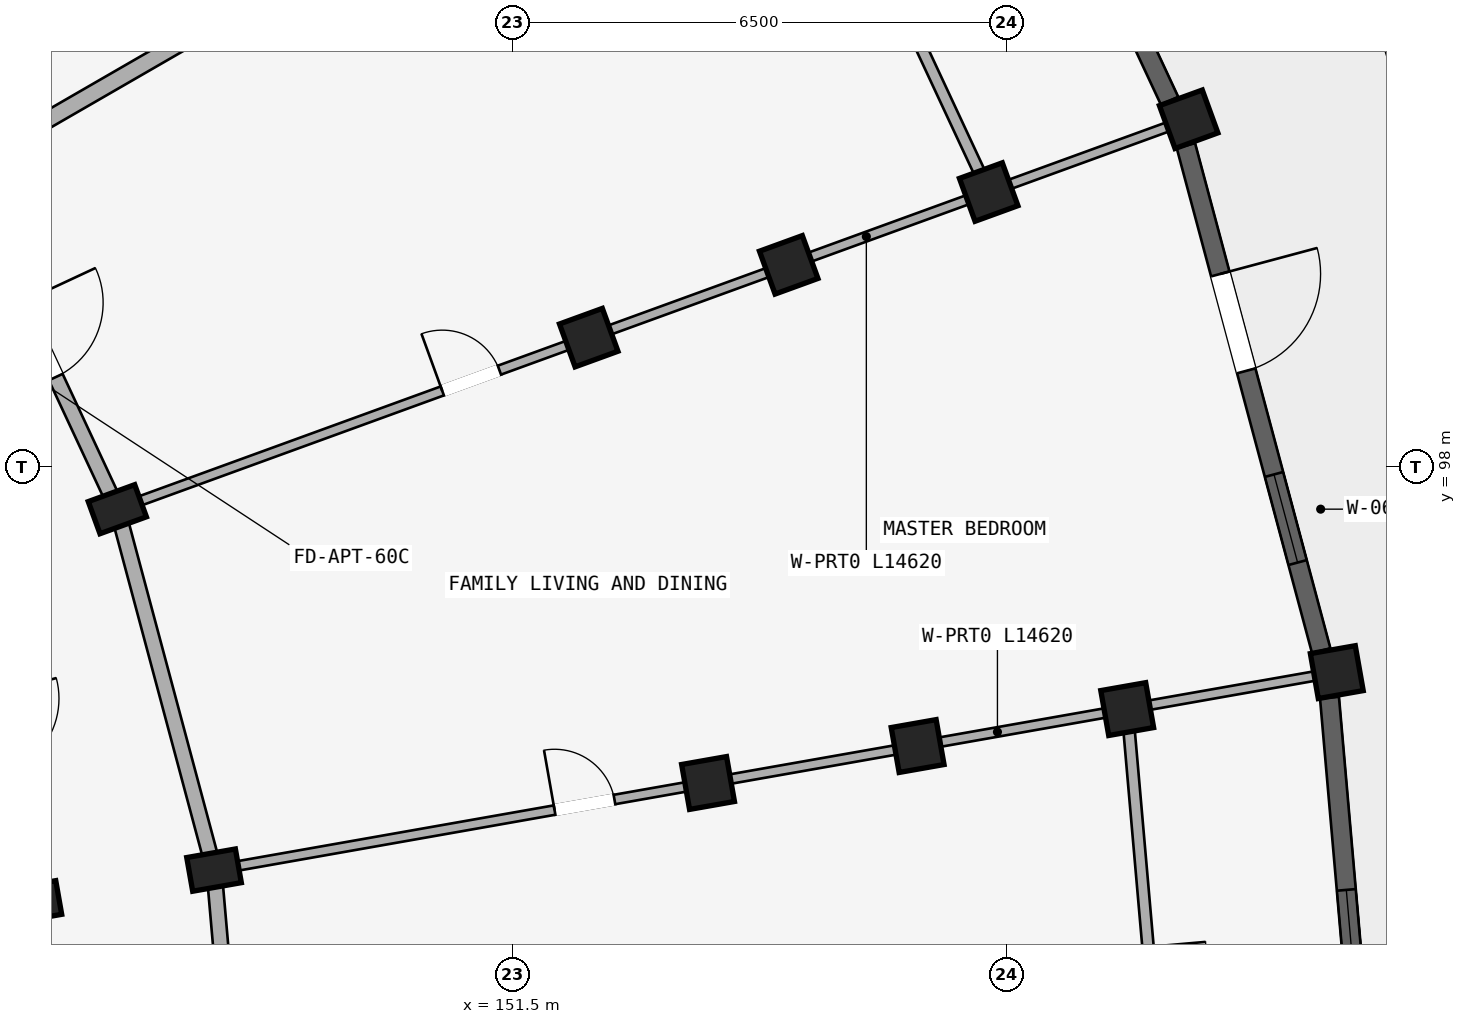
"""IFC4 building model, lengths in metres.
Left out: names, types, materials, properties, quantities, classifications, styles, units other than length and angle.
Written with IfcOpenShell. Run it as: python <this file> out.ifc"""

import sys

from ifc_helpers import new_model, si_unit, direction, frame, frame_2d, origin, origin_2d, place, context, subcontext, project, spatial, rectangle, extrude, element, fill, save


model = new_model("IFC4")
c1 = context("Model", 3, precision=1e-05, world=origin(), true_north=direction((0.0, 1.0)))
c2 = subcontext(c1, "Body", "Model", "MODEL_VIEW")
j1 = project(units=[si_unit("LENGTHUNIT", "METRE"), si_unit("PLANEANGLEUNIT", "RADIAN")], contexts=[c1])
p1 = place(None, origin())
s1 = spatial("IfcSite", under=j1, at=p1, CompositionType="ELEMENT")
p2 = place(p1, origin())
s2 = spatial("IfcBuilding", under=s1, at=p2, CompositionType="ELEMENT")
p3 = place(p2, frame((0.0, 0.0, 30.75)))
s3 = spatial("IfcBuildingStorey", under=s2, at=p3, CompositionType="ELEMENT", Elevation=30.75)
p4 = place(p3, frame((146.299, 97.445, 0.0), z_axis=(0.0, 0.0, 1.0), x_axis=(-0.342020143326, 0.939692620786, 0.0)))
e1 = element("IfcColumn", 1, at=p4, inside=s3, PredefinedType="COLUMN", context=c2, shape_type="SweptSolid", body=[
    extrude(rectangle(XDim=0.45, YDim=0.65, at=origin_2d()), origin(), (0.0, 0.0, 1.0), 2.93),
])
for number, where, z_axis, x_axis in (
    (2, (152.501, 99.702, 0.0), (0.0, 0.0, 1.0), (-0.342, 0.94, 0.0)),
    (3, (155.132, 100.66, 0.0), (0.0, 0.0, 1.0), (-0.342, 0.94, 0.0)),
    (4, (157.764, 101.618, 0.0), (0.0, 0.0, 1.0), (-0.342, 0.94, 0.0)),
):
    element("IfcColumn", number, at=place(p3, frame(where, z_axis=z_axis, x_axis=x_axis)), inside=s3, PredefinedType="COLUMN", context=c2, shape_type="SweptSolid", body=[
        extrude(rectangle(XDim=0.6, YDim=0.6, at=origin_2d()), origin(), (0.0, 0.0, 1.0), 2.93),
    ])
p5 = place(p3, frame((160.395, 102.575, 0.0), z_axis=(0.0, 0.0, 1.0), x_axis=(-0.342020143326, 0.939692620786, 0.0)))
e5 = element("IfcColumn", 5, at=p5, inside=s3, PredefinedType="COLUMN", context=c2, shape_type="SweptSolid", body=[
    extrude(rectangle(XDim=0.6, YDim=0.6, at=origin_2d()), origin(), (0.0, 0.0, 1.0), 2.97),
])
for number, where, z_axis, x_axis in (
    (6, (145.208, 92.28, 0.0), (0.0, 0.0, 1.0), (-0.174, 0.985, 0.0)),
    (7, (147.572, 92.697, 0.0), (0.0, 0.0, 1.0), (-0.174, 0.985, 0.0)),
):
    element("IfcColumn", number, at=place(p3, frame(where, z_axis=z_axis, x_axis=x_axis)), inside=s3, PredefinedType="COLUMN", context=c2, shape_type="SweptSolid", body=[
        extrude(rectangle(XDim=0.45, YDim=0.65, at=origin_2d()), origin(), (0.0, 0.0, 1.0), 2.93),
    ])
for number, where, z_axis, x_axis in (
    (8, (154.071, 93.843, 0.0), (0.0, 0.0, 1.0), (-0.174, 0.985, 0.0)),
    (9, (156.829, 94.329, 0.0), (0.0, 0.0, 1.0), (-0.174, 0.985, 0.0)),
    (10, (159.586, 94.815, 0.0), (0.0, 0.0, 1.0), (-0.174, 0.985, 0.0)),
):
    element("IfcColumn", number, at=place(p3, frame(where, z_axis=z_axis, x_axis=x_axis)), inside=s3, PredefinedType="COLUMN", context=c2, shape_type="SweptSolid", body=[
        extrude(rectangle(XDim=0.6, YDim=0.6, at=origin_2d()), origin(), (0.0, 0.0, 1.0), 2.93),
    ])
p6 = place(p3, frame((162.344, 95.302, 0.0), z_axis=(0.0, 0.0, 1.0), x_axis=(-0.173648177667, 0.984807753012, 0.0)))
e11 = element("IfcColumn", 11, at=p6, inside=s3, PredefinedType="COLUMN", context=c2, shape_type="SweptSolid", body=[
    extrude(rectangle(XDim=0.6, YDim=0.6, at=origin_2d()), origin(), (0.0, 0.0, 1.0), 2.97),
])
p7 = place(p3, frame((144.222, 101.9, 0.0), z_axis=(0.0, 0.0, 1.0), x_axis=(0.422629854778, -0.906302381024, 0.0)))
e12 = element("IfcWall", 12, at=p7, inside=s3, PredefinedType="STANDARD", context=c2, shape_type="SweptSolid", body=[
    extrude(rectangle(XDim=4.915, YDim=0.2, at=frame_2d((2.458, 0.0))), origin(), (0.0, 0.0, 1.0), 2.372),
])
p8 = place(p7, frame((1.918, 0.0, 0.0)))
e13 = element("IfcOpeningElement", 13, at=p8, cuts=e12, PredefinedType="OPENING", context=c2, shape_type="SweptSolid", body=[
    extrude(rectangle(XDim=1.08, YDim=2.15, at=frame_2d((0.54, 1.075))), frame((0.0, 0.11, 0.0), z_axis=(0.0, -1.0, 0.0), x_axis=(1.0, 0.0, 0.0)), (0.0, 0.0, 1.0), 0.22),
])
p9 = place(p3, frame((146.299, 97.445, 0.0), z_axis=(0.0, 0.0, 1.0), x_axis=(0.258803112091, -0.965930095386, 0.0)))
e14 = element("IfcWall", 14, at=p9, inside=s3, PredefinedType="STANDARD", context=c2, shape_type="SweptSolid", body=[
    extrude(rectangle(XDim=4.916, YDim=0.2, at=frame_2d((2.458, 0.0))), origin(), (0.0, 0.0, 1.0), 2.372),
])
p10 = place(p3, frame((145.208, 92.28, 0.0), z_axis=(0.0, 0.0, 1.0), x_axis=(0.087187153726, -0.996191949488, 0.0)))
e15 = element("IfcWall", 15, at=p10, inside=s3, PredefinedType="STANDARD", context=c2, shape_type="SweptSolid", body=[
    extrude(rectangle(XDim=4.497, YDim=0.2, at=frame_2d((2.249, 0.0))), origin(), (0.0, 0.0, 1.0), 2.372),
])
p11 = place(p3, frame((147.572, 92.697, 0.0), z_axis=(0.0, 0.0, 1.0), x_axis=(0.087167566415, -0.996193663584, 0.0)))
e16 = element("IfcWall", 16, at=p11, inside=s3, PredefinedType="STANDARD", context=c2, shape_type="SweptSolid", body=[
    extrude(rectangle(XDim=4.916, YDim=0.2, at=frame_2d((2.458, 0.0))), origin(), (0.0, 0.0, 1.0), 2.372),
])
p12 = place(p3, frame((144.309, 101.95, 0.0), z_axis=(0.0, 0.0, 1.0), x_axis=(0.866020956416, 0.500007702989, 0.0)))
e17 = element("IfcWall", 17, at=p12, inside=s3, PredefinedType="STANDARD", context=c2, shape_type="SweptSolid", body=[
    extrude(rectangle(XDim=14.62, YDim=0.22, at=frame_2d((7.31, 0.0))), origin(), (0.0, 0.0, 1.0), 2.372),
])
p13 = place(p3, frame((146.393, 97.479, 0.0), z_axis=(0.0, 0.0, 1.0), x_axis=(0.939694408106, 0.342015232663, 0.0)))
e18 = element("IfcWall", 18, at=p13, inside=s3, PredefinedType="PARTITIONING", context=c2, shape_type="SweptSolid", body=[
    extrude(rectangle(XDim=14.62, YDim=0.125, at=frame_2d((7.31, 0.0))), origin(), (0.0, 0.0, 1.0), 2.372),
])
p14 = place(p13, frame((4.449, 0.0, 0.0)))
e19 = element("IfcOpeningElement", 19, at=p14, cuts=e18, PredefinedType="OPENING", context=c2, shape_type="SweptSolid", body=[
    extrude(rectangle(XDim=0.8, YDim=2.1, at=frame_2d((0.4, 1.05))), frame((0.0, 0.073, 0.0), z_axis=(0.0, -1.0, 0.0), x_axis=(1.0, 0.0, 0.0)), (0.0, 0.0, 1.0), 0.145),
])
p15 = place(p3, frame((147.67, 92.714, 0.0), z_axis=(0.0, 0.0, 1.0), x_axis=(0.984809269474, 0.173639577162, 0.0)))
e20 = element("IfcWall", 20, at=p15, inside=s3, PredefinedType="PARTITIONING", context=c2, shape_type="SweptSolid", body=[
    extrude(rectangle(XDim=14.62, YDim=0.125, at=frame_2d((7.31, 0.0))), origin(), (0.0, 0.0, 1.0), 2.372),
])
p16 = place(p15, frame((4.449, 0.0, 0.0)))
e21 = element("IfcOpeningElement", 21, at=p16, cuts=e20, PredefinedType="OPENING", context=c2, shape_type="SweptSolid", body=[
    extrude(rectangle(XDim=0.8, YDim=2.1, at=frame_2d((0.4, 1.05))), frame((0.0, 0.073, 0.0), z_axis=(0.0, -1.0, 0.0), x_axis=(1.0, 0.0, 0.0)), (0.0, 0.0, 1.0), 0.145),
])
p17 = place(p3, frame((154.787, 108.0, 0.0), z_axis=(0.0, 0.0, 1.0), x_axis=(0.422640621205, -0.906297360311, 0.0)))
e22 = element("IfcWall", 22, at=p17, inside=s3, PredefinedType="PLUMBINGWALL", context=c2, shape_type="SweptSolid", body=[
    extrude(rectangle(XDim=7.042, YDim=0.15, at=frame_2d((3.521, 0.0))), origin(), (0.0, 0.0, 1.0), 2.372),
])
p18 = place(p17, frame((3.121, 0.0, 0.0)))
e23 = element("IfcOpeningElement", 23, at=p18, cuts=e22, PredefinedType="OPENING", context=c2, shape_type="SweptSolid", body=[
    extrude(rectangle(XDim=0.8, YDim=2.1, at=frame_2d((0.4, 1.05))), frame((0.0, 0.085, 0.0), z_axis=(0.0, -1.0, 0.0), x_axis=(1.0, 0.0, 0.0)), (0.0, 0.0, 1.0), 0.17),
])
p19 = place(p3, frame((159.586, 94.815, 0.0), z_axis=(0.0, 0.0, 1.0), x_axis=(0.087156198737, -0.996194658198, 0.0)))
e24 = element("IfcWall", 24, at=p19, inside=s3, PredefinedType="PLUMBINGWALL", context=c2, shape_type="SweptSolid", body=[
    extrude(rectangle(XDim=7.042, YDim=0.15, at=frame_2d((3.521, 0.0))), origin(), (0.0, 0.0, 1.0), 2.372),
])
p20 = place(p19, frame((3.141, 0.0, 0.0)))
e25 = element("IfcOpeningElement", 25, at=p20, cuts=e24, PredefinedType="OPENING", context=c2, shape_type="SweptSolid", body=[
    extrude(rectangle(XDim=0.76, YDim=2.05, at=frame_2d((0.38, 1.025))), frame((0.0, 0.085, 0.0), z_axis=(0.0, -1.0, 0.0), x_axis=(1.0, 0.0, 0.0)), (0.0, 0.0, 1.0), 0.17),
])
p21 = place(p3, frame((157.237, 109.052, 0.0), z_axis=(0.0, 0.0, 1.0), x_axis=(0.422628979279, -0.906302789289, 0.0)))
e26 = element("IfcWall", 26, at=p21, inside=s3, PredefinedType="STANDARD", context=c2, shape_type="SweptSolid", body=[
    extrude(rectangle(XDim=6.879, YDim=0.25, at=frame_2d((3.439, 0.0))), origin(), (0.0, 0.0, 1.0), 2.412),
])
p22 = place(p21, frame((2.34, 0.0, 0.312)))
e27 = element("IfcOpeningElement", 27, at=p22, cuts=e26, PredefinedType="OPENING", context=c2, shape_type="SweptSolid", body=[
    extrude(rectangle(XDim=2.2, YDim=1.9, at=frame_2d((1.1, 0.95))), frame((0.0, 0.135, 0.0), z_axis=(0.0, -1.0, 0.0), x_axis=(1.0, 0.0, 0.0)), (0.0, 0.0, 1.0), 0.27),
])
p23 = place(p3, frame((160.358, 102.228, 0.0), z_axis=(0.0, 0.0, 1.0), x_axis=(0.258835428922, -0.965921436109, 0.0)))
e28 = element("IfcWall", 28, at=p23, inside=s3, PredefinedType="STANDARD", context=c2, shape_type="SweptSolid", body=[
    extrude(rectangle(XDim=6.879, YDim=0.25, at=frame_2d((3.439, 0.0))), origin(), (0.0, 0.0, 1.0), 2.412),
])
p24 = place(p23, frame((4.479, 0.0, 0.462)))
e29 = element("IfcOpeningElement", 29, at=p24, cuts=e28, PredefinedType="OPENING", context=c2, shape_type="SweptSolid", body=[
    extrude(rectangle(XDim=1.2, YDim=1.5, at=frame_2d((0.6, 0.75))), frame((0.0, 0.135, 0.0), z_axis=(0.0, -1.0, 0.0), x_axis=(1.0, 0.0, 0.0)), (0.0, 0.0, 1.0), 0.27),
])
p25 = place(p23, frame((1.748, 0.0, 0.0)))
e30 = element("IfcOpeningElement", 30, at=p25, cuts=e28, PredefinedType="OPENING", context=c2, shape_type="SweptSolid", body=[
    extrude(rectangle(XDim=1.32, YDim=2.15, at=frame_2d((0.66, 1.075))), frame((0.0, 0.135, 0.0), z_axis=(0.0, -1.0, 0.0), x_axis=(1.0, 0.0, 0.0)), (0.0, 0.0, 1.0), 0.27),
])
p26 = place(p3, frame((162.248, 94.966, 0.0), z_axis=(0.0, 0.0, 1.0), x_axis=(0.087165629485, -0.996193833065, 0.0)))
e31 = element("IfcWall", 31, at=p26, inside=s3, PredefinedType="STANDARD", context=c2, shape_type="SweptSolid", body=[
    extrude(rectangle(XDim=6.879, YDim=0.25, at=frame_2d((3.439, 0.0))), origin(), (0.0, 0.0, 1.0), 2.412),
])
p27 = place(p26, frame((2.54, 0.0, 0.562)))
e32 = element("IfcOpeningElement", 32, at=p27, cuts=e31, PredefinedType="OPENING", context=c2, shape_type="SweptSolid", body=[
    extrude(rectangle(XDim=1.8, YDim=1.65, at=frame_2d((0.9, 0.825))), frame((0.0, 0.135, 0.0), z_axis=(0.0, -1.0, 0.0), x_axis=(1.0, 0.0, 0.0)), (0.0, 0.0, 1.0), 0.27),
])
p28 = place(p24, origin())
e33 = element("IfcWindow", 33, at=p28, inside=s3, PartitioningType="SINGLE_PANEL", PredefinedType="WINDOW", context=c2, shape_type="SweptSolid", body=[
    extrude(rectangle(XDim=1.2, YDim=1.5, at=frame_2d((0.6, 0.75))), frame((0.0, 0.03, 0.0), z_axis=(0.0, -1.0, 0.0), x_axis=(1.0, 0.0, 0.0)), (0.0, 0.0, 1.0), 0.06),
])
fill(e29, e33)
p29 = place(p27, origin())
e34 = element("IfcWindow", 34, at=p29, inside=s3, PartitioningType="DOUBLE_PANEL_VERTICAL", PredefinedType="WINDOW", context=c2, shape_type="SweptSolid", body=[
    extrude(rectangle(XDim=1.8, YDim=1.65, at=frame_2d((0.9, 0.825))), frame((0.0, 0.03, 0.0), z_axis=(0.0, -1.0, 0.0), x_axis=(1.0, 0.0, 0.0)), (0.0, 0.0, 1.0), 0.06),
])
fill(e32, e34)
p30 = place(p14, frame((0.8, 0.0, 0.0), z_axis=(0.0, 0.0, 1.0), x_axis=(-1.0, 0.0, 0.0)))
e35 = element("IfcDoor", 35, at=p30, inside=s3, OperationType="SINGLE_SWING_RIGHT", PredefinedType="DOOR", context=c2, shape_type="SweptSolid", body=[
    extrude(rectangle(XDim=0.8, YDim=2.1, at=frame_2d((0.4, 1.05))), frame((0.0, 0.025, 0.0), z_axis=(0.0, -1.0, 0.0), x_axis=(1.0, 0.0, 0.0)), (0.0, 0.0, 1.0), 0.05),
])
fill(e19, e35)
p31 = place(p16, frame((0.8, 0.0, 0.0), z_axis=(0.0, 0.0, 1.0), x_axis=(-1.0, 0.0, 0.0)))
e36 = element("IfcDoor", 36, at=p31, inside=s3, OperationType="SINGLE_SWING_RIGHT", PredefinedType="DOOR", context=c2, shape_type="SweptSolid", body=[
    extrude(rectangle(XDim=0.8, YDim=2.1, at=frame_2d((0.4, 1.05))), frame((0.0, 0.025, 0.0), z_axis=(0.0, -1.0, 0.0), x_axis=(1.0, 0.0, 0.0)), (0.0, 0.0, 1.0), 0.05),
])
fill(e21, e36)
p32 = place(p8, origin())
e37 = element("IfcDoor", 37, at=p32, inside=s3, OperationType="SINGLE_SWING_LEFT", PredefinedType="DOOR", context=c2, shape_type="SweptSolid", body=[
    extrude(rectangle(XDim=1.08, YDim=2.15, at=frame_2d((0.54, 1.075))), frame((0.0, 0.025, 0.0), z_axis=(0.0, -1.0, 0.0), x_axis=(1.0, 0.0, 0.0)), (0.0, 0.0, 1.0), 0.05),
])
fill(e13, e37)
p33 = place(p25, origin())
e38 = element("IfcDoor", 38, at=p33, inside=s3, OperationType="SINGLE_SWING_LEFT", PredefinedType="DOOR", context=c2, shape_type="SweptSolid", body=[
    extrude(rectangle(XDim=1.32, YDim=2.15, at=frame_2d((0.66, 1.075))), frame((0.0, 0.025, 0.0), z_axis=(0.0, -1.0, 0.0), x_axis=(1.0, 0.0, 0.0)), (0.0, 0.0, 1.0), 0.05),
])
fill(e30, e38)
save(model, sys.argv[1])
